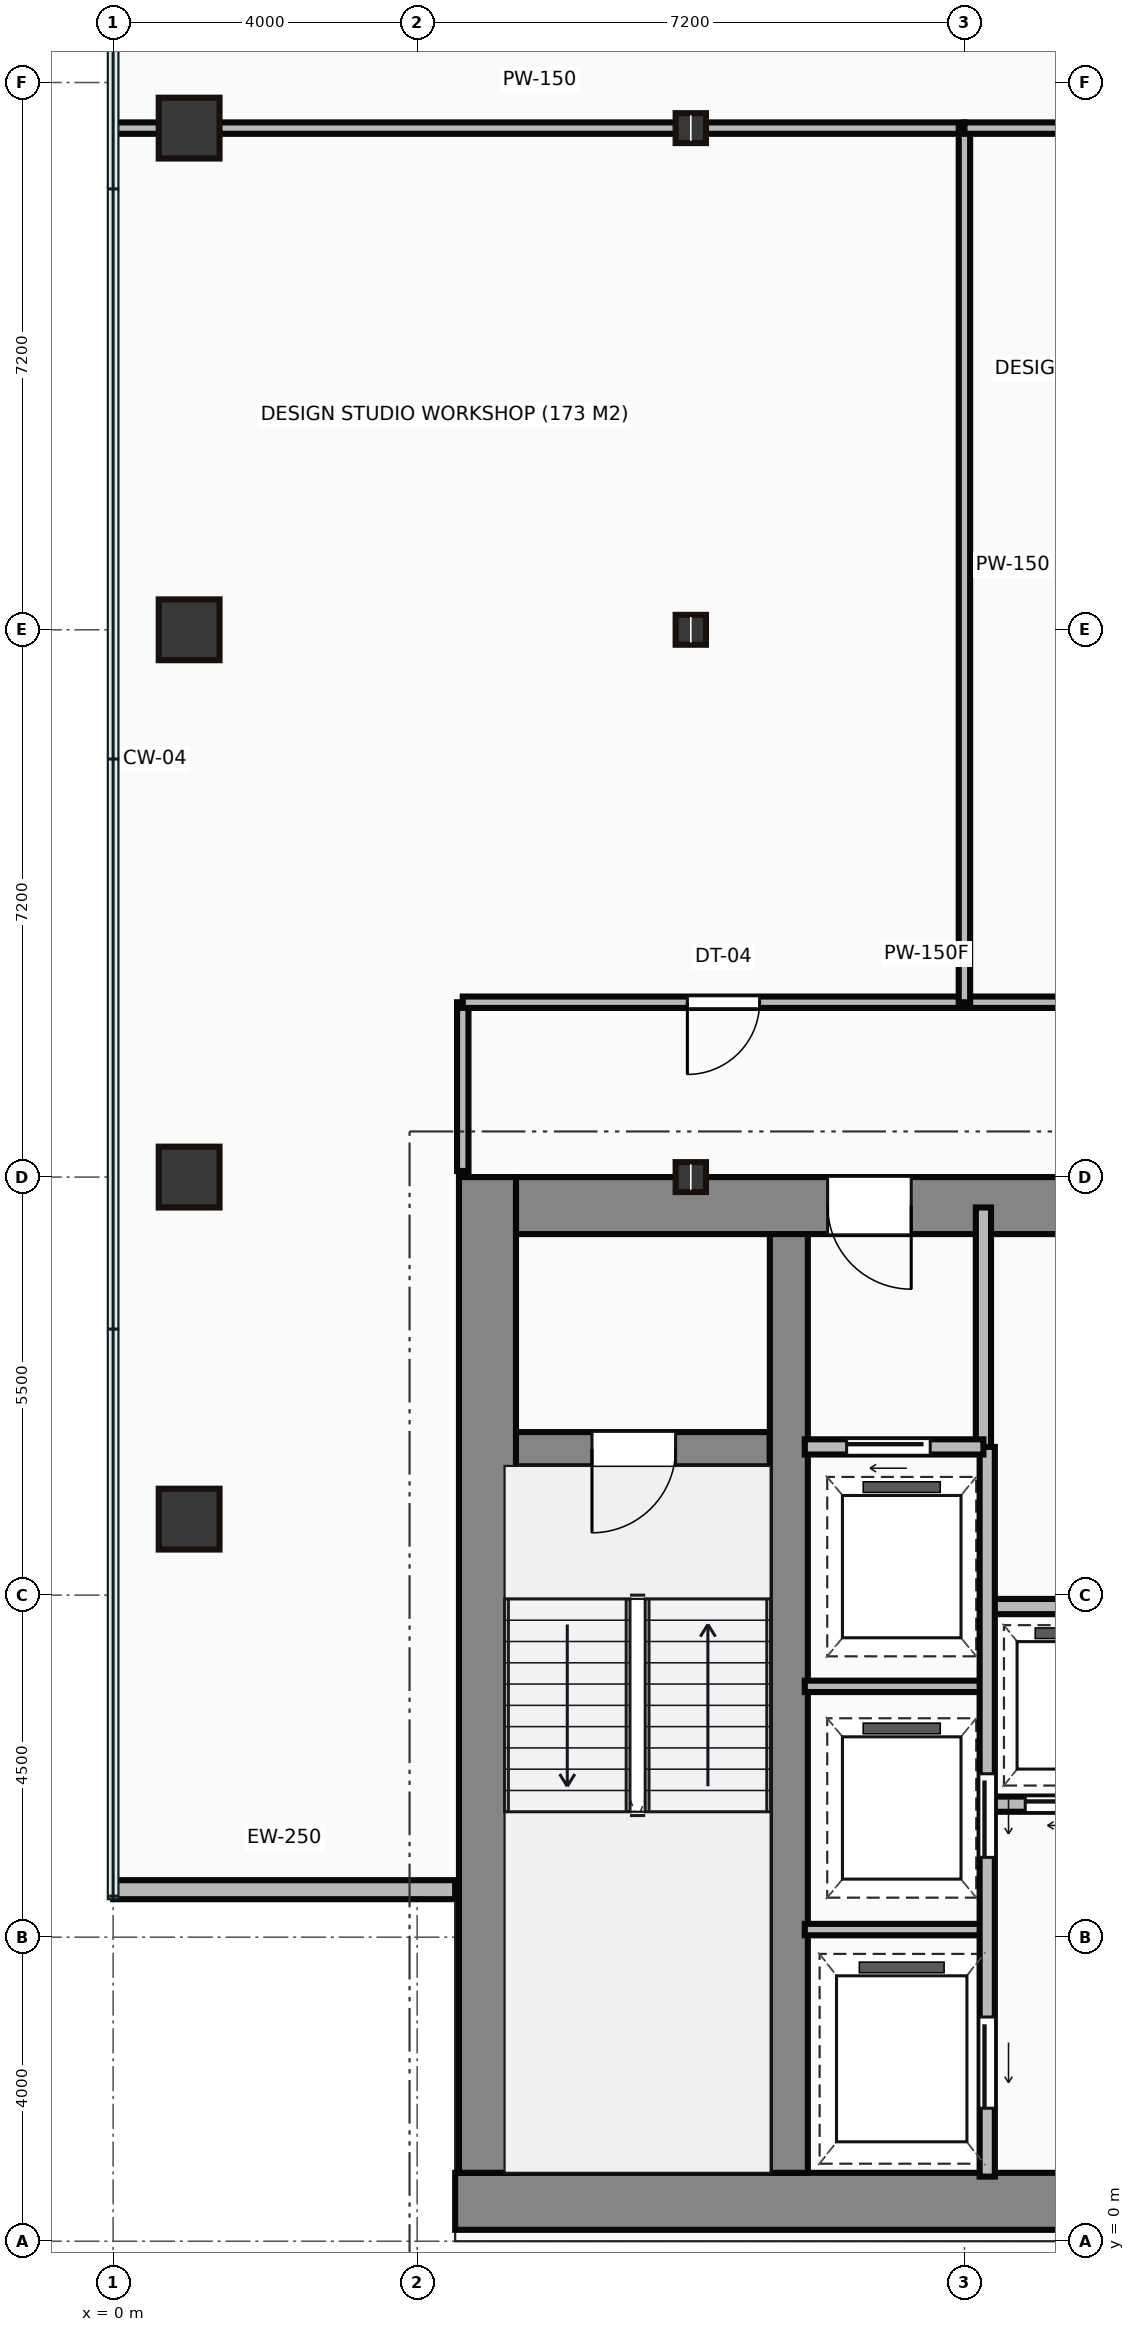
"""IFC4 building model, lengths in metres.
Left out: names, types, materials, properties, quantities, classifications, styles, units other than length and angle.
Written with IfcOpenShell. Run it as: python <this file> out.ifc"""

import sys

from ifc_helpers import new_model, si_unit, direction, frame, frame_2d, origin, origin_2d, place, context, subcontext, project, spatial, rectangle, hollow_rectangle, i_section, extrude, source, transform, mapped, element, fill, save


model = new_model("IFC4")
c1 = context("Model", 3, precision=1e-05, world=origin(), true_north=direction((0.0, 1.0)))
c2 = subcontext(c1, "Body", "Model", "MODEL_VIEW")
j1 = project(units=[si_unit("LENGTHUNIT", "METRE"), si_unit("PLANEANGLEUNIT", "RADIAN")], contexts=[c1])
p1 = place(None, origin())
s1 = spatial("IfcSite", under=j1, at=p1, CompositionType="ELEMENT")
p2 = place(p1, origin())
s2 = spatial("IfcBuilding", under=s1, at=p2, CompositionType="ELEMENT")
p3 = place(p2, frame((0.0, 0.0, 128.8)))
s3 = spatial("IfcBuildingStorey", under=s2, at=p3, CompositionType="ELEMENT", Elevation=128.8)
m1 = source(origin(), c2, "Body", "SweptSolid", [
    extrude(rectangle(XDim=29.5, YDim=0.75, at=frame_2d((14.75, 0.0))), origin(), (0.0, 0.0, 1.0), 3.65),
])
p4 = place(p3, frame((4.5, 0.525, 0.0), z_axis=(0.0, 0.0, 1.0), x_axis=(1.0, 0.0, 0.0)))
e1 = element("IfcWall", 1, at=p4, inside=s3, PredefinedType="SHEAR", context=c2, shape_type="MappedRepresentation", body=[
    mapped(m1, transform((0.0, 0.0, 0.0))),
])
m2 = source(origin(), c2, "Body", "SweptSolid", [
    extrude(rectangle(XDim=13.1, YDim=0.75, at=frame_2d((6.55, 0.0))), origin(), (0.0, 0.0, 1.0), 3.65),
])
p5 = place(p3, frame((4.925, 0.9, 0.0), z_axis=(0.0, 0.0, 1.0), x_axis=(0.0, 1.0, 0.0)))
e2 = element("IfcWall", 2, at=p5, inside=s3, PredefinedType="SHEAR", context=c2, shape_type="MappedRepresentation", body=[
    mapped(m2, transform((0.0, 0.0, 0.0))),
])
m3 = source(origin(), c2, "Body", "SweptSolid", [
    extrude(rectangle(XDim=9.1, YDim=0.75, at=frame_2d((4.55, 0.0))), origin(), (0.0, 0.0, 1.0), 3.65),
])
p6 = place(p3, frame((5.3, 13.625, 0.0), z_axis=(0.0, 0.0, 1.0), x_axis=(1.0, 0.0, 0.0)))
e3 = element("IfcWall", 3, at=p6, inside=s3, PredefinedType="SHEAR", context=c2, shape_type="MappedRepresentation", body=[
    mapped(m3, transform((0.0, 0.0, 0.0))),
])
p7 = place(p6, frame((4.1, 0.0, 0.0)))
e4 = element("IfcOpeningElement", 4, at=p7, cuts=e3, PredefinedType="OPENING", context=c2, shape_type="SweptSolid", body=[
    extrude(rectangle(XDim=1.1, YDim=2.15, at=frame_2d((0.55, 1.075))), frame((0.0, 0.385, 0.0), z_axis=(0.0, -1.0, 0.0), x_axis=(1.0, 0.0, 0.0)), (0.0, 0.0, 1.0), 0.77),
])
m4 = source(origin(), c2, "Body", "SweptSolid", [
    extrude(rectangle(XDim=12.35, YDim=0.5, at=frame_2d((6.175, 0.0))), origin(), (0.0, 0.0, 1.0), 3.65),
])
p8 = place(p3, frame((8.89, 0.9, 0.0), z_axis=(0.0, 0.0, 1.0), x_axis=(0.0, 1.0, 0.0)))
e5 = element("IfcWall", 5, at=p8, inside=s3, PredefinedType="SHEAR", context=c2, shape_type="MappedRepresentation", body=[
    mapped(m4, transform((0.0, 0.0, 0.0))),
])
m5 = source(origin(), c2, "Body", "SweptSolid", [
    extrude(rectangle(XDim=3.39, YDim=0.45, at=frame_2d((1.695, 0.0))), origin(), (0.0, 0.0, 1.0), 3.65),
])
p9 = place(p3, frame((5.25, 10.42, 0.0), z_axis=(0.0, 0.0, 1.0), x_axis=(1.0, 0.0, 0.0)))
e6 = element("IfcWall", 6, at=p9, inside=s3, PredefinedType="SHEAR", context=c2, shape_type="MappedRepresentation", body=[
    mapped(m5, transform((0.0, 0.0, 0.0))),
])
p10 = place(p9, frame((1.05, 0.0, 0.0)))
e7 = element("IfcOpeningElement", 7, at=p10, cuts=e6, PredefinedType="OPENING", context=c2, shape_type="SweptSolid", body=[
    extrude(rectangle(XDim=1.1, YDim=2.15, at=frame_2d((0.55, 1.075))), frame((0.0, 0.235, 0.0), z_axis=(0.0, -1.0, 0.0), x_axis=(1.0, 0.0, 0.0)), (0.0, 0.0, 1.0), 0.47),
])
m6 = source(origin(), c2, "Body", "SweptSolid", [
    extrude(hollow_rectangle(XDim=0.8, YDim=0.8, WallThickness=0.04, at=origin_2d()), origin(), (0.0, 0.0, 1.0), 3.65),
])
for number, where, z_axis, x_axis in (
    (8, (1.0, 9.5, 0.0), (0.0, 0.0, 1.0), (1.0, 0.0, 0.0)),
    (9, (1.0, 14.0, 0.0), (0.0, 0.0, 1.0), (1.0, 0.0, 0.0)),
    (10, (1.0, 21.2, 0.0), (0.0, 0.0, 1.0), (1.0, 0.0, 0.0)),
    (11, (1.0, 27.8, 0.0), (0.0, 0.0, 1.0), (1.0, 0.0, 0.0)),
):
    element("IfcColumn", number, at=place(p3, frame(where, z_axis=z_axis, x_axis=x_axis)), inside=s3, PredefinedType="COLUMN", context=c2, shape_type="MappedRepresentation", body=[
        mapped(m6, transform((0.0, 0.0, 0.0))),
    ])
m7 = source(origin(), c2, "Body", "SweptSolid", [
    extrude(i_section(OverallWidth=0.399, OverallDepth=0.393, WebThickness=0.023, FlangeThickness=0.037, at=origin_2d()), origin(), (0.0, 0.0, 1.0), 3.65),
])
for number, where, z_axis, x_axis in (
    (12, (7.6, 14.0, 0.0), (0.0, 0.0, 1.0), (1.0, 0.0, 0.0)),
    (13, (7.6, 21.2, 0.0), (0.0, 0.0, 1.0), (1.0, 0.0, 0.0)),
    (14, (7.6, 27.8, 0.0), (0.0, 0.0, 1.0), (1.0, 0.0, 0.0)),
):
    element("IfcColumn", number, at=place(p3, frame(where, z_axis=z_axis, x_axis=x_axis)), inside=s3, PredefinedType="COLUMN", context=c2, shape_type="MappedRepresentation", body=[
        mapped(m7, transform((0.0, 0.0, 0.0))),
    ])
m8 = source(origin(), c2, "Body", "SweptSolid", [
    extrude(rectangle(XDim=4.5, YDim=0.25, at=frame_2d((2.25, 0.0))), origin(), (0.0, 0.0, 1.0), 3.4),
])
p11 = place(p3, frame((0.0, 4.625, 0.0), z_axis=(0.0, 0.0, 1.0), x_axis=(1.0, 0.0, 0.0)))
e15 = element("IfcWall", 15, at=p11, inside=s3, PredefinedType="STANDARD", context=c2, shape_type="MappedRepresentation", body=[
    mapped(m8, transform((0.0, 0.0, 0.0))),
])
m9 = source(origin(), c2, "Body", "SweptSolid", [
    extrude(rectangle(XDim=3.18, YDim=0.2, at=frame_2d((1.59, 0.0))), origin(), (0.0, 0.0, 1.0), 3.4),
])
p12 = place(p3, frame((11.45, 10.42, 0.0), z_axis=(0.0, 0.0, 1.0), x_axis=(0.0, 1.0, 0.0)))
e16 = element("IfcWall", 16, at=p12, inside=s3, PredefinedType="PARTITIONING", context=c2, shape_type="MappedRepresentation", body=[
    mapped(m9, transform((0.0, 0.0, 0.0))),
])
m10 = source(origin(), c2, "Body", "SweptSolid", [
    extrude(rectangle(XDim=2.35, YDim=0.2, at=frame_2d((1.175, 0.0))), origin(), (0.0, 0.0, 1.0), 3.4),
])
p13 = place(p3, frame((9.1, 10.45, 0.0), z_axis=(0.0, 0.0, 1.0), x_axis=(1.0, 0.0, 0.0)))
e17 = element("IfcWall", 17, at=p13, inside=s3, PredefinedType="PARTITIONING", context=c2, shape_type="MappedRepresentation", body=[
    mapped(m10, transform((0.0, 0.0, 0.0))),
])
p14 = place(p13, frame((0.55, 0.0, 0.0)))
e18 = element("IfcOpeningElement", 18, at=p14, cuts=e17, PredefinedType="OPENING", context=c2, shape_type="SweptSolid", body=[
    extrude(rectangle(XDim=1.1, YDim=2.15, at=frame_2d((0.55, 1.075))), frame((0.0, 0.11, 0.0), z_axis=(0.0, -1.0, 0.0), x_axis=(1.0, 0.0, 0.0)), (0.0, 0.0, 1.0), 0.22),
])
m11 = source(origin(), c2, "Body", "SweptSolid", [
    extrude(rectangle(XDim=9.6, YDim=0.2, at=frame_2d((4.8, 0.0))), origin(), (0.0, 0.0, 1.0), 3.4),
])
p15 = place(p3, frame((11.5, 0.85, 0.0), z_axis=(0.0, 0.0, 1.0), x_axis=(0.0, 1.0, 0.0)))
e19 = element("IfcWall", 19, at=p15, inside=s3, PredefinedType="PARTITIONING", context=c2, shape_type="MappedRepresentation", body=[
    mapped(m11, transform((0.0, 0.0, 0.0))),
])
p16 = place(p15, frame((4.2, 0.0, 0.0)))
e20 = element("IfcOpeningElement", 20, at=p16, cuts=e19, PredefinedType="OPENING", context=c2, shape_type="SweptSolid", body=[
    extrude(rectangle(XDim=1.1, YDim=2.15, at=frame_2d((0.55, 1.075))), frame((0.0, 0.11, 0.0), z_axis=(0.0, -1.0, 0.0), x_axis=(1.0, 0.0, 0.0)), (0.0, 0.0, 1.0), 0.22),
])
p17 = place(p15, frame((0.9, 0.0, 0.0)))
e21 = element("IfcOpeningElement", 21, at=p17, cuts=e19, PredefinedType="OPENING", context=c2, shape_type="SweptSolid", body=[
    extrude(rectangle(XDim=1.2, YDim=2.15, at=frame_2d((0.6, 1.075))), frame((0.0, 0.11, 0.0), z_axis=(0.0, -1.0, 0.0), x_axis=(1.0, 0.0, 0.0)), (0.0, 0.0, 1.0), 0.22),
])
m12 = source(origin(), c2, "Body", "SweptSolid", [
    extrude(rectangle(XDim=2.4, YDim=0.15, at=frame_2d((1.2, 0.0))), origin(), (0.0, 0.0, 1.0), 3.4),
])
for number, where, z_axis, x_axis in (
    (22, (9.1, 4.1, 0.0), (0.0, 0.0, 1.0), (1.0, 0.0, 0.0)),
    (23, (9.1, 7.3, 0.0), (0.0, 0.0, 1.0), (1.0, 0.0, 0.0)),
):
    element("IfcWall", number, at=place(p3, frame(where, z_axis=z_axis, x_axis=x_axis)), inside=s3, PredefinedType="PARTITIONING", context=c2, shape_type="MappedRepresentation", body=[
        mapped(m12, transform((0.0, 0.0, 0.0))),
    ])
m13 = source(origin(), c2, "Body", "SweptSolid", [
    extrude(rectangle(XDim=11.85, YDim=0.2, at=frame_2d((5.925, 0.0))), origin(), (0.0, 0.0, 1.0), 3.4),
])
p18 = place(p3, frame((11.55, 5.75, 0.0), z_axis=(0.0, 0.0, 1.0), x_axis=(1.0, 0.0, 0.0)))
e24 = element("IfcWall", 24, at=p18, inside=s3, PredefinedType="PARTITIONING", context=c2, shape_type="MappedRepresentation", body=[
    mapped(m13, transform((0.0, 0.0, 0.0))),
])
p19 = place(p18, frame((0.45, 0.0, 0.0)))
e25 = element("IfcOpeningElement", 25, at=p19, cuts=e24, PredefinedType="OPENING", context=c2, shape_type="SweptSolid", body=[
    extrude(rectangle(XDim=1.05, YDim=2.15, at=frame_2d((0.525, 1.075))), frame((0.0, 0.11, 0.0), z_axis=(0.0, -1.0, 0.0), x_axis=(1.0, 0.0, 0.0)), (0.0, 0.0, 1.0), 0.22),
])
p20 = place(p18, frame((2.4, 0.0, 0.0)))
e26 = element("IfcOpeningElement", 26, at=p20, cuts=e24, PredefinedType="OPENING", context=c2, shape_type="SweptSolid", body=[
    extrude(rectangle(XDim=1.05, YDim=2.15, at=frame_2d((0.525, 1.075))), frame((0.0, 0.11, 0.0), z_axis=(0.0, -1.0, 0.0), x_axis=(1.0, 0.0, 0.0)), (0.0, 0.0, 1.0), 0.22),
])
p21 = place(p18, frame((4.35, 0.0, 0.0)))
e27 = element("IfcOpeningElement", 27, at=p21, cuts=e24, PredefinedType="OPENING", context=c2, shape_type="SweptSolid", body=[
    extrude(rectangle(XDim=1.05, YDim=2.15, at=frame_2d((0.525, 1.075))), frame((0.0, 0.11, 0.0), z_axis=(0.0, -1.0, 0.0), x_axis=(1.0, 0.0, 0.0)), (0.0, 0.0, 1.0), 0.22),
])
p22 = place(p18, frame((6.3, 0.0, 0.0)))
e28 = element("IfcOpeningElement", 28, at=p22, cuts=e24, PredefinedType="OPENING", context=c2, shape_type="SweptSolid", body=[
    extrude(rectangle(XDim=1.05, YDim=2.15, at=frame_2d((0.525, 1.075))), frame((0.0, 0.11, 0.0), z_axis=(0.0, -1.0, 0.0), x_axis=(1.0, 0.0, 0.0)), (0.0, 0.0, 1.0), 0.22),
])
p23 = place(p18, frame((8.25, 0.0, 0.0)))
e29 = element("IfcOpeningElement", 29, at=p23, cuts=e24, PredefinedType="OPENING", context=c2, shape_type="SweptSolid", body=[
    extrude(rectangle(XDim=1.05, YDim=2.15, at=frame_2d((0.525, 1.075))), frame((0.0, 0.11, 0.0), z_axis=(0.0, -1.0, 0.0), x_axis=(1.0, 0.0, 0.0)), (0.0, 0.0, 1.0), 0.22),
])
p24 = place(p18, frame((10.2, 0.0, 0.0)))
e30 = element("IfcOpeningElement", 30, at=p24, cuts=e24, PredefinedType="OPENING", context=c2, shape_type="SweptSolid", body=[
    extrude(rectangle(XDim=1.05, YDim=2.15, at=frame_2d((0.525, 1.075))), frame((0.0, 0.11, 0.0), z_axis=(0.0, -1.0, 0.0), x_axis=(1.0, 0.0, 0.0)), (0.0, 0.0, 1.0), 0.22),
])
p25 = place(p3, frame((11.55, 8.35, 0.0), z_axis=(0.0, 0.0, 1.0), x_axis=(1.0, 0.0, 0.0)))
e31 = element("IfcWall", 31, at=p25, inside=s3, PredefinedType="PARTITIONING", context=c2, shape_type="MappedRepresentation", body=[
    mapped(m13, transform((0.0, 0.0, 0.0))),
])
m14 = source(origin(), c2, "Body", "SweptSolid", [
    extrude(rectangle(XDim=2.22, YDim=0.15, at=frame_2d((1.11, 0.0))), origin(), (0.0, 0.0, 1.0), 3.4),
])
p26 = place(p3, frame((4.6, 14.08, 0.0), z_axis=(0.0, 0.0, 1.0), x_axis=(0.0, 1.0, 0.0)))
e32 = element("IfcWall", 32, at=p26, inside=s3, PredefinedType="PARTITIONING", context=c2, shape_type="MappedRepresentation", body=[
    mapped(m14, transform((0.0, 0.0, 0.0))),
])
m15 = source(origin(), c2, "Body", "SweptSolid", [
    extrude(rectangle(XDim=12.2, YDim=0.15, at=frame_2d((6.1, 0.0))), origin(), (0.0, 0.0, 1.0), 3.4),
])
p27 = place(p3, frame((4.6, 16.3, 0.0), z_axis=(0.0, 0.0, 1.0), x_axis=(1.0, 0.0, 0.0)))
e33 = element("IfcWall", 33, at=p27, inside=s3, PredefinedType="PARTITIONING", context=c2, shape_type="MappedRepresentation", body=[
    mapped(m15, transform((0.0, 0.0, 0.0))),
])
p28 = place(p27, frame((2.955, 0.0, 0.0)))
e34 = element("IfcOpeningElement", 34, at=p28, cuts=e33, PredefinedType="OPENING", context=c2, shape_type="SweptSolid", body=[
    extrude(rectangle(XDim=0.95, YDim=2.15, at=frame_2d((0.475, 1.075))), frame((0.0, 0.085, 0.0), z_axis=(0.0, -1.0, 0.0), x_axis=(1.0, 0.0, 0.0)), (0.0, 0.0, 1.0), 0.17),
])
m16 = source(origin(), c2, "Body", "SweptSolid", [
    extrude(rectangle(XDim=11.18, YDim=0.15, at=frame_2d((5.59, 0.0))), origin(), (0.0, 0.0, 1.0), 2.702),
])
p29 = place(p3, frame((0.02, 27.8, 0.0), z_axis=(0.0, 0.0, 1.0), x_axis=(1.0, 0.0, 0.0)))
e35 = element("IfcWall", 35, at=p29, inside=s3, PredefinedType="PARTITIONING", context=c2, shape_type="MappedRepresentation", body=[
    mapped(m16, transform((0.0, 0.0, 0.0))),
])
m17 = source(origin(), c2, "Body", "SweptSolid", [
    extrude(rectangle(XDim=11.5, YDim=0.15, at=frame_2d((5.75, 0.0))), origin(), (0.0, 0.0, 1.0), 3.4),
])
p30 = place(p3, frame((11.2, 27.8, 0.0), z_axis=(0.0, 0.0, 1.0), x_axis=(0.0, -1.0, 0.0)))
e36 = element("IfcWall", 36, at=p30, inside=s3, PredefinedType="PARTITIONING", context=c2, shape_type="MappedRepresentation", body=[
    mapped(m17, transform((0.0, 0.0, 0.0))),
])
m18 = source(origin(), c2, "Body", "SweptSolid", [
    extrude(rectangle(XDim=5.6, YDim=0.15, at=frame_2d((2.8, 0.0))), origin(), (0.0, 0.0, 1.0), 2.702),
])
p31 = place(p3, frame((16.8, 27.8, 0.0), z_axis=(0.0, 0.0, 1.0), x_axis=(-1.0, 0.0, 0.0)))
e37 = element("IfcWall", 37, at=p31, inside=s3, PredefinedType="PARTITIONING", context=c2, shape_type="MappedRepresentation", body=[
    mapped(m18, transform((0.0, 0.0, 0.0))),
])
m19 = source(origin(), c2, "Body", "SweptSolid", [
    extrude(rectangle(XDim=1.1, YDim=2.15, at=frame_2d((0.55, 1.075))), frame((0.0, 0.025, 0.0), z_axis=(0.0, -1.0, 0.0), x_axis=(1.0, 0.0, 0.0)), (0.0, 0.0, 1.0), 0.05),
])
p32 = place(p10, frame((1.1, 0.0, 0.0), z_axis=(0.0, 0.0, 1.0), x_axis=(-1.0, 0.0, 0.0)))
e38 = element("IfcDoor", 38, at=p32, inside=s3, OperationType="SINGLE_SWING_LEFT", PredefinedType="DOOR", context=c2, shape_type="MappedRepresentation", body=[
    mapped(m19, transform((0.0, 0.0, 0.0))),
])
fill(e7, e38)
p33 = place(p7, origin())
e39 = element("IfcDoor", 39, at=p33, inside=s3, OperationType="SINGLE_SWING_RIGHT", PredefinedType="DOOR", context=c2, shape_type="MappedRepresentation", body=[
    mapped(m19, transform((0.0, 0.0, 0.0))),
])
fill(e4, e39)
p34 = place(p14, origin())
e40 = element("IfcDoor", 40, at=p34, inside=s3, OperationType="SLIDING_TO_LEFT", PredefinedType="DOOR", context=c2, shape_type="MappedRepresentation", body=[
    mapped(m19, transform((0.0, 0.0, 0.0))),
])
fill(e18, e40)
p35 = place(p16, frame((1.1, 0.0, 0.0), z_axis=(0.0, 0.0, 1.0), x_axis=(-1.0, 0.0, 0.0)))
e41 = element("IfcDoor", 41, at=p35, inside=s3, OperationType="SLIDING_TO_LEFT", PredefinedType="DOOR", context=c2, shape_type="MappedRepresentation", body=[
    mapped(m19, transform((0.0, 0.0, 0.0))),
])
fill(e20, e41)
m20 = source(origin(), c2, "Body", "SweptSolid", [
    extrude(rectangle(XDim=1.2, YDim=2.15, at=frame_2d((0.6, 1.075))), frame((0.0, 0.025, 0.0), z_axis=(0.0, -1.0, 0.0), x_axis=(1.0, 0.0, 0.0)), (0.0, 0.0, 1.0), 0.05),
])
p36 = place(p17, frame((1.2, 0.0, 0.0), z_axis=(0.0, 0.0, 1.0), x_axis=(-1.0, 0.0, 0.0)))
e42 = element("IfcDoor", 42, at=p36, inside=s3, OperationType="SLIDING_TO_LEFT", PredefinedType="DOOR", context=c2, shape_type="MappedRepresentation", body=[
    mapped(m20, transform((0.0, 0.0, 0.0))),
])
fill(e21, e42)
m21 = source(origin(), c2, "Body", "SweptSolid", [
    extrude(rectangle(XDim=1.05, YDim=2.15, at=frame_2d((0.525, 1.075))), frame((0.0, 0.025, 0.0), z_axis=(0.0, -1.0, 0.0), x_axis=(1.0, 0.0, 0.0)), (0.0, 0.0, 1.0), 0.05),
])
p37 = place(p19, frame((1.05, 0.0, 0.0), z_axis=(0.0, 0.0, 1.0), x_axis=(-1.0, 0.0, 0.0)))
e43 = element("IfcDoor", 43, at=p37, inside=s3, OperationType="SLIDING_TO_LEFT", PredefinedType="DOOR", context=c2, shape_type="MappedRepresentation", body=[
    mapped(m21, transform((0.0, 0.0, 0.0))),
])
fill(e25, e43)
m22 = source(origin(), c2, "Body", "SweptSolid", [
    extrude(rectangle(XDim=0.95, YDim=2.15, at=frame_2d((0.475, 1.075))), frame((0.0, 0.025, 0.0), z_axis=(0.0, -1.0, 0.0), x_axis=(1.0, 0.0, 0.0)), (0.0, 0.0, 1.0), 0.05),
])
p38 = place(p28, origin())
e44 = element("IfcDoor", 44, at=p38, inside=s3, OperationType="SINGLE_SWING_LEFT", PredefinedType="DOOR", context=c2, shape_type="MappedRepresentation", body=[
    mapped(m22, transform((0.0, 0.0, 0.0))),
])
fill(e34, e44)
save(model, sys.argv[1])
